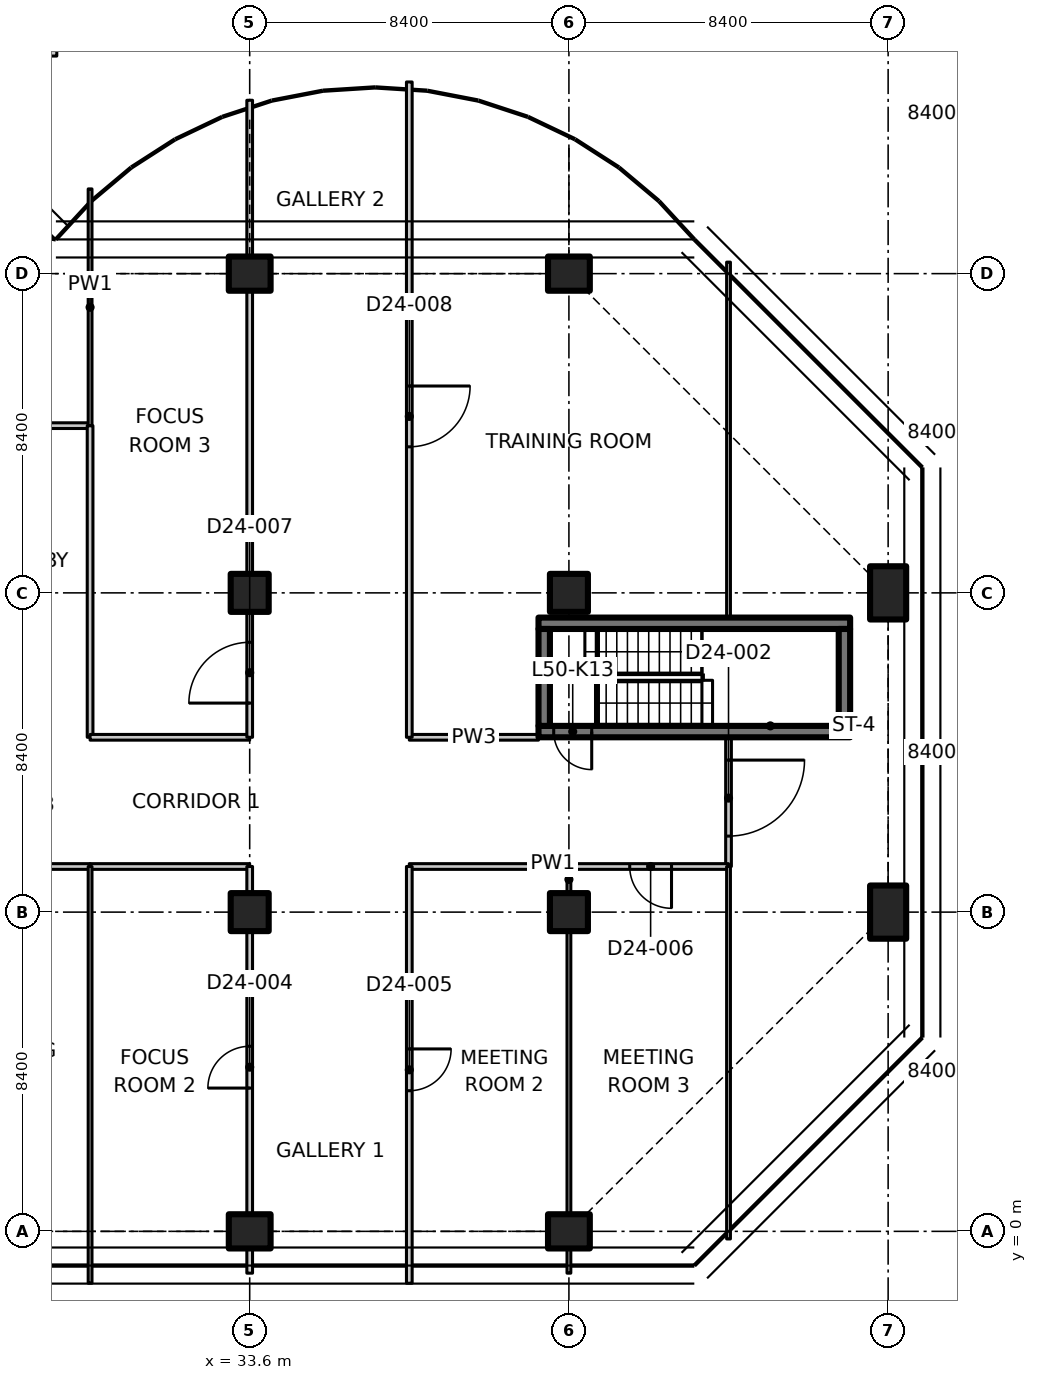
"""IFC4 building model, lengths in metres.
Left out: names, types, materials, properties, quantities, classifications, styles, units other than length and angle.
Written with IfcOpenShell. Run it as: python <this file> out.ifc"""

import sys

from ifc_helpers import new_model, si_unit, direction, frame, frame_2d, origin, origin_2d, place, context, subcontext, project, spatial, polyline, rectangle, outline, extrude, element, fill, save


model = new_model("IFC4")
c1 = context("Model", 3, precision=1e-05, world=origin(), true_north=direction((0.0, 1.0)))
c2 = subcontext(c1, "Body", "Model", "MODEL_VIEW")
j1 = project(units=[si_unit("LENGTHUNIT", "METRE"), si_unit("PLANEANGLEUNIT", "RADIAN")], contexts=[c1])
p1 = place(None, origin())
s1 = spatial("IfcSite", under=j1, at=p1, CompositionType="ELEMENT")
p2 = place(p1, origin())
s2 = spatial("IfcBuilding", under=s1, at=p2, CompositionType="ELEMENT")
p3 = place(p2, frame((0.0, 0.0, 199.2)))
s3 = spatial("IfcBuildingStorey", under=s2, at=p3, CompositionType="ELEMENT", Elevation=199.2)
p4 = place(p3, frame((33.6, 0.0, 0.0), z_axis=(0.0, 0.0, 1.0), x_axis=(0.0, 1.0, 0.0)))
e1 = element("IfcColumn", 1, at=p4, inside=s3, PredefinedType="COLUMN", context=c2, shape_type="SweptSolid", body=[
    extrude(rectangle(XDim=0.9, YDim=1.1, at=origin_2d()), origin(), (0.0, 0.0, 1.0), 3.35),
])
for number, where, z_axis, x_axis in (
    (2, (33.6, 8.4, 0.0), (0.0, 0.0, 1.0), (1.0, 0.0, 0.0)),
    (3, (33.6, 16.8, 0.0), (0.0, 0.0, 1.0), (1.0, 0.0, 0.0)),
):
    element("IfcColumn", number, at=place(p3, frame(where, z_axis=z_axis, x_axis=x_axis)), inside=s3, PredefinedType="COLUMN", context=c2, shape_type="SweptSolid", body=[
        extrude(rectangle(XDim=1.0, YDim=1.0, at=origin_2d()), origin(), (0.0, 0.0, 1.0), 3.35),
    ])
for number, where, z_axis, x_axis in (
    (4, (33.6, 25.2, 0.0), (0.0, 0.0, 1.0), (0.0, 1.0, 0.0)),
    (5, (42.0, 0.0, 0.0), (0.0, 0.0, 1.0), (0.0, 1.0, 0.0)),
):
    element("IfcColumn", number, at=place(p3, frame(where, z_axis=z_axis, x_axis=x_axis)), inside=s3, PredefinedType="COLUMN", context=c2, shape_type="SweptSolid", body=[
        extrude(rectangle(XDim=0.9, YDim=1.1, at=origin_2d()), origin(), (0.0, 0.0, 1.0), 3.35),
    ])
for number, where, z_axis, x_axis in (
    (6, (42.0, 8.4, 0.0), (0.0, 0.0, 1.0), (1.0, 0.0, 0.0)),
    (7, (42.0, 16.8, 0.0), (0.0, 0.0, 1.0), (1.0, 0.0, 0.0)),
):
    element("IfcColumn", number, at=place(p3, frame(where, z_axis=z_axis, x_axis=x_axis)), inside=s3, PredefinedType="COLUMN", context=c2, shape_type="SweptSolid", body=[
        extrude(rectangle(XDim=1.0, YDim=1.0, at=origin_2d()), origin(), (0.0, 0.0, 1.0), 3.35),
    ])
p5 = place(p3, frame((42.0, 25.2, 0.0), z_axis=(0.0, 0.0, 1.0), x_axis=(0.0, 1.0, 0.0)))
e8 = element("IfcColumn", 8, at=p5, inside=s3, PredefinedType="COLUMN", context=c2, shape_type="SweptSolid", body=[
    extrude(rectangle(XDim=0.9, YDim=1.1, at=origin_2d()), origin(), (0.0, 0.0, 1.0), 3.35),
])
for number, where, z_axis, x_axis in (
    (9, (50.4, 8.4, 0.0), (0.0, 0.0, 1.0), (1.0, 0.0, 0.0)),
    (10, (50.4, 16.8, 0.0), (0.0, 0.0, 1.0), (1.0, 0.0, 0.0)),
):
    element("IfcColumn", number, at=place(p3, frame(where, z_axis=z_axis, x_axis=x_axis)), inside=s3, PredefinedType="COLUMN", context=c2, shape_type="SweptSolid", body=[
        extrude(rectangle(XDim=0.95, YDim=1.4, at=origin_2d()), origin(), (0.0, 0.0, 1.0), 3.35),
    ])
p6 = place(p3, frame((49.4, 13.15, 0.0), z_axis=(0.0, 0.0, 1.0), x_axis=(-1.0, 0.0, 0.0)))
e11 = element("IfcWall", 11, at=p6, inside=s3, PredefinedType="SHEAR", context=c2, shape_type="SweptSolid", body=[
    extrude(rectangle(XDim=8.2, YDim=0.3, at=frame_2d((4.1, 0.0))), origin(), (0.0, 0.0, 1.0), 3.35),
])
p7 = place(p6, frame((6.8, 0.0, 0.0)))
e12 = element("IfcOpeningElement", 12, at=p7, cuts=e11, PredefinedType="OPENING", context=c2, shape_type="SweptSolid", body=[
    extrude(rectangle(XDim=1.0, YDim=2.1, at=frame_2d((0.5, 1.05))), frame((0.0, 0.16, 0.0), z_axis=(0.0, -1.0, 0.0), x_axis=(1.0, 0.0, 0.0)), (0.0, 0.0, 1.0), 0.32),
])
p8 = place(p3, frame((41.2, 16.0, 0.0), z_axis=(0.0, 0.0, 1.0), x_axis=(1.0, 0.0, 0.0)))
e13 = element("IfcWall", 13, at=p8, inside=s3, PredefinedType="SHEAR", context=c2, shape_type="SweptSolid", body=[
    extrude(rectangle(XDim=8.2, YDim=0.3, at=frame_2d((4.1, 0.0))), origin(), (0.0, 0.0, 1.0), 3.35),
])
for number, where, z_axis, x_axis in (
    (14, (41.35, 13.3, 0.0), (0.0, 0.0, 1.0), (0.0, 1.0, 0.0)),
    (15, (49.25, 13.3, 0.0), (0.0, 0.0, 1.0), (0.0, 1.0, 0.0)),
):
    element("IfcWall", number, at=place(p3, frame(where, z_axis=z_axis, x_axis=x_axis)), inside=s3, PredefinedType="SHEAR", context=c2, shape_type="SweptSolid", body=[
        extrude(rectangle(XDim=2.55, YDim=0.3, at=frame_2d((1.275, 0.0))), origin(), (0.0, 0.0, 1.0), 3.35),
    ])
p9 = place(p3, frame((25.2, 21.2, 0.0), z_axis=(0.0, 0.0, 1.0), x_axis=(1.0, 0.0, 0.0)))
e16 = element("IfcWall", 16, at=p9, inside=s3, PredefinedType="PARTITIONING", context=c2, shape_type="SweptSolid", body=[
    extrude(rectangle(XDim=4.2, YDim=0.15, at=frame_2d((2.1, 0.0))), origin(), (0.0, 0.0, 1.0), 3.33),
])
p10 = place(p3, frame((29.4, 9.6, 0.0), z_axis=(0.0, 0.0, 1.0), x_axis=(-1.0, 0.0, 0.0)))
e17 = element("IfcWall", 17, at=p10, inside=s3, PredefinedType="PARTITIONING", context=c2, shape_type="SweptSolid", body=[
    extrude(rectangle(XDim=4.2, YDim=0.15, at=frame_2d((2.1, 0.0))), origin(), (0.0, 0.0, 1.0), 3.33),
])
p11 = place(p10, frame((1.5, 0.0, 0.0)))
e18 = element("IfcOpeningElement", 18, at=p11, cuts=e17, PredefinedType="OPENING", context=c2, shape_type="SweptSolid", body=[
    extrude(rectangle(XDim=1.1, YDim=2.1, at=frame_2d((0.55, 1.05))), frame((0.0, 0.085, 0.0), z_axis=(0.0, -1.0, 0.0), x_axis=(1.0, 0.0, 0.0)), (0.0, 0.0, 1.0), 0.17),
])
p12 = place(p3, frame((29.4, 21.2, 0.0), z_axis=(0.0, 0.0, 1.0), x_axis=(0.0, -1.0, 0.0)))
e19 = element("IfcWall", 19, at=p12, inside=s3, PredefinedType="PARTITIONING", context=c2, shape_type="SweptSolid", body=[
    extrude(rectangle(XDim=8.2, YDim=0.15, at=frame_2d((4.1, 0.0))), origin(), (0.0, 0.0, 1.0), 3.33),
])
p13 = place(p3, frame((29.4, 27.429, 0.0), z_axis=(0.0, 0.0, 1.0), x_axis=(0.0, -1.0, 0.0)))
e20 = element("IfcWall", 20, at=p13, inside=s3, PredefinedType="PARTITIONING", context=c2, shape_type="SweptSolid", body=[
    extrude(outline(polyline([(0.0, 0.0), (6.229, 0.0), (6.229, 3.33), (2.679, 3.33), (2.677, 2.98), (1.781, 2.98), (1.779, 3.33), (0.154, 3.33), (0.0, 3.33), (0.0, 0.0)])), frame((0.0, 0.05, 0.0), z_axis=(0.0, -1.0, 0.0), x_axis=(1.0, 0.0, 0.0)), (0.0, 0.0, 1.0), 0.1),
])
p14 = place(p3, frame((25.2, 31.0, 0.0), z_axis=(0.0, 0.0, 1.0), x_axis=(1.0, 0.0, 0.0)))
e21 = element("IfcWall", 21, at=p14, inside=s3, PredefinedType="PARTITIONING", context=c2, shape_type="SweptSolid", body=[
    extrude(rectangle(XDim=3.324, YDim=0.15, at=frame_2d((1.662, 0.0))), origin(), (0.0, 0.0, 1.0), 2.98),
])
p15 = place(p3, frame((46.2, 13.0, 0.0), z_axis=(0.0, 0.0, 1.0), x_axis=(0.0, -1.0, 0.0)))
e22 = element("IfcWall", 22, at=p15, inside=s3, PredefinedType="PARTITIONING", context=c2, shape_type="SweptSolid", body=[
    extrude(rectangle(XDim=3.4, YDim=0.15, at=frame_2d((1.7, 0.0))), origin(), (0.0, 0.0, 1.0), 3.33),
])
p16 = place(p15, frame((0.6, 0.0, 0.0)))
e23 = element("IfcOpeningElement", 23, at=p16, cuts=e22, PredefinedType="OPENING", context=c2, shape_type="SweptSolid", body=[
    extrude(rectangle(XDim=2.0, YDim=2.4, at=frame_2d((1.0, 1.2))), frame((0.0, 0.085, 0.0), z_axis=(0.0, -1.0, 0.0), x_axis=(1.0, 0.0, 0.0)), (0.0, 0.0, 1.0), 0.17),
])
p17 = place(p3, frame((33.6, 9.6, 0.0), z_axis=(0.0, 0.0, 1.0), x_axis=(-1.0, 0.0, 0.0)))
e24 = element("IfcWall", 24, at=p17, inside=s3, PredefinedType="PARTITIONING", context=c2, shape_type="SweptSolid", body=[
    extrude(rectangle(XDim=4.2, YDim=0.15, at=frame_2d((2.1, 0.0))), origin(), (0.0, 0.0, 1.0), 3.33),
])
p18 = place(p3, frame((42.0, 9.6, 0.0), z_axis=(0.0, 0.0, 1.0), x_axis=(-1.0, 0.0, 0.0)))
e25 = element("IfcWall", 25, at=p18, inside=s3, PredefinedType="PARTITIONING", context=c2, shape_type="SweptSolid", body=[
    extrude(rectangle(XDim=4.2, YDim=0.15, at=frame_2d((2.1, 0.0))), origin(), (0.0, 0.0, 1.0), 3.33),
])
p19 = place(p3, frame((46.2, 9.6, 0.0), z_axis=(0.0, 0.0, 1.0), x_axis=(-1.0, 0.0, 0.0)))
e26 = element("IfcWall", 26, at=p19, inside=s3, PredefinedType="PARTITIONING", context=c2, shape_type="SweptSolid", body=[
    extrude(rectangle(XDim=4.2, YDim=0.15, at=frame_2d((2.1, 0.0))), origin(), (0.0, 0.0, 1.0), 3.33),
])
p20 = place(p19, frame((1.5, 0.0, 0.0)))
e27 = element("IfcOpeningElement", 27, at=p20, cuts=e26, PredefinedType="OPENING", context=c2, shape_type="SweptSolid", body=[
    extrude(rectangle(XDim=1.1, YDim=2.1, at=frame_2d((0.55, 1.05))), frame((0.0, 0.085, 0.0), z_axis=(0.0, -1.0, 0.0), x_axis=(1.0, 0.0, 0.0)), (0.0, 0.0, 1.0), 0.17),
])
p21 = place(p3, frame((29.4, 13.0, 0.0), z_axis=(0.0, 0.0, 1.0), x_axis=(1.0, 0.0, 0.0)))
e28 = element("IfcWall", 28, at=p21, inside=s3, PredefinedType="PARTITIONING", context=c2, shape_type="SweptSolid", body=[
    extrude(rectangle(XDim=4.2, YDim=0.15, at=frame_2d((2.1, 0.0))), origin(), (0.0, 0.0, 1.0), 3.33),
])
p22 = place(p3, frame((37.8, 13.0, 0.0), z_axis=(0.0, 0.0, 1.0), x_axis=(1.0, 0.0, 0.0)))
e29 = element("IfcWall", 29, at=p22, inside=s3, PredefinedType="PARTITIONING", context=c2, shape_type="SweptSolid", body=[
    extrude(rectangle(XDim=3.4, YDim=0.15, at=frame_2d((1.7, 0.0))), origin(), (0.0, 0.0, 1.0), 3.33),
])
p23 = place(p3, frame((46.2, -0.2, 0.0), z_axis=(0.0, 0.0, 1.0), x_axis=(0.0, 1.0, 0.0)))
e30 = element("IfcWall", 30, at=p23, inside=s3, PredefinedType="PARTITIONING", context=c2, shape_type="SweptSolid", body=[
    extrude(outline(polyline([(0.0, 0.0), (9.8, 0.0), (9.8, 3.33), (5.066, 3.33), (5.064, 2.98), (3.736, 2.98), (3.734, 3.33), (0.0, 3.33), (0.0, 0.0)])), frame((0.0, 0.05, 0.0), z_axis=(0.0, -1.0, 0.0), x_axis=(1.0, 0.0, 0.0)), (0.0, 0.0, 1.0), 0.1),
])
p24 = place(p3, frame((46.2, 16.15, 0.0), z_axis=(0.0, 0.0, 1.0), x_axis=(0.0, 1.0, 0.0)))
e31 = element("IfcWall", 31, at=p24, inside=s3, PredefinedType="PARTITIONING", context=c2, shape_type="SweptSolid", body=[
    extrude(outline(polyline([(0.0, 0.0), (9.353, 0.0), (9.353, 3.33), (9.25, 3.33), (5.516, 3.33), (5.514, 2.98), (4.186, 2.98), (4.184, 3.33), (0.0, 3.33), (0.0, 0.0)])), frame((0.0, 0.05, 0.0), z_axis=(0.0, -1.0, 0.0), x_axis=(1.0, 0.0, 0.0)), (0.0, 0.0, 1.0), 0.1),
])
p25 = place(p3, frame((33.6, -1.1, 0.0), z_axis=(0.0, 0.0, 1.0), x_axis=(0.0, 1.0, 0.0)))
e32 = element("IfcWall", 32, at=p25, inside=s3, PredefinedType="PARTITIONING", context=c2, shape_type="SweptSolid", body=[
    extrude(rectangle(XDim=0.63, YDim=0.15, at=frame_2d((0.315, 0.0))), origin(), (0.0, 0.0, 1.0), 3.33),
])
p26 = place(p3, frame((33.6, 0.47, 0.0), z_axis=(0.0, 0.0, 1.0), x_axis=(0.0, 1.0, 0.0)))
e33 = element("IfcWall", 33, at=p26, inside=s3, PredefinedType="PARTITIONING", context=c2, shape_type="SweptSolid", body=[
    extrude(rectangle(XDim=7.41, YDim=0.15, at=frame_2d((3.705, 0.0))), origin(), (0.0, 0.0, 1.0), 3.33),
])
p27 = place(p26, frame((3.3, 0.0, 0.0)))
e34 = element("IfcOpeningElement", 34, at=p27, cuts=e33, PredefinedType="OPENING", context=c2, shape_type="SweptSolid", body=[
    extrude(rectangle(XDim=1.1, YDim=2.1, at=frame_2d((0.55, 1.05))), frame((0.0, 0.085, 0.0), z_axis=(0.0, -1.0, 0.0), x_axis=(1.0, 0.0, 0.0)), (0.0, 0.0, 1.0), 0.17),
])
p28 = place(p3, frame((33.6, 8.92, 0.0), z_axis=(0.0, 0.0, 1.0), x_axis=(0.0, 1.0, 0.0)))
e35 = element("IfcWall", 35, at=p28, inside=s3, PredefinedType="PARTITIONING", context=c2, shape_type="SweptSolid", body=[
    extrude(rectangle(XDim=0.68, YDim=0.15, at=frame_2d((0.34, 0.0))), origin(), (0.0, 0.0, 1.0), 3.33),
])
p29 = place(p3, frame((37.8, 9.6, 0.0), z_axis=(0.0, 0.0, 1.0), x_axis=(0.0, -1.0, 0.0)))
e36 = element("IfcWall", 36, at=p29, inside=s3, PredefinedType="PARTITIONING", context=c2, shape_type="SweptSolid", body=[
    extrude(outline(polyline([(0.0, 0.0), (10.965, 0.0), (10.965, 3.33), (10.7, 3.33), (10.05, 3.33), (10.048, 2.98), (9.152, 2.98), (9.15, 3.33), (0.0, 3.33), (0.0, 0.0)])), frame((0.0, 0.075, 0.0), z_axis=(0.0, -1.0, 0.0), x_axis=(1.0, 0.0, 0.0)), (0.0, 0.0, 1.0), 0.15),
])
p30 = place(p29, frame((4.8, 0.0, 0.0)))
e37 = element("IfcOpeningElement", 37, at=p30, cuts=e36, PredefinedType="OPENING", context=c2, shape_type="SweptSolid", body=[
    extrude(rectangle(XDim=1.1, YDim=2.1, at=frame_2d((0.55, 1.05))), frame((0.0, 0.085, 0.0), z_axis=(0.0, -1.0, 0.0), x_axis=(1.0, 0.0, 0.0)), (0.0, 0.0, 1.0), 0.17),
])
p31 = place(p3, frame((29.4, 9.6, 0.0), z_axis=(0.0, 0.0, 1.0), x_axis=(0.0, -1.0, 0.0)))
e38 = element("IfcWall", 38, at=p31, inside=s3, PredefinedType="PARTITIONING", context=c2, shape_type="SweptSolid", body=[
    extrude(outline(polyline([(0.0, 0.0), (10.965, 0.0), (10.965, 3.33), (10.7, 3.33), (10.05, 3.33), (10.048, 2.98), (9.152, 2.98), (9.15, 3.33), (0.0, 3.33), (0.0, 0.0)])), frame((0.0, 0.05, 0.0), z_axis=(0.0, -1.0, 0.0), x_axis=(1.0, 0.0, 0.0)), (0.0, 0.0, 1.0), 0.1),
])
p32 = place(p3, frame((42.0, 9.6, 0.0), z_axis=(0.0, 0.0, 1.0), x_axis=(0.0, -1.0, 0.0)))
e39 = element("IfcWall", 39, at=p32, inside=s3, PredefinedType="PARTITIONING", context=c2, shape_type="SweptSolid", body=[
    extrude(rectangle(XDim=0.68, YDim=0.1, at=frame_2d((0.34, 0.0))), origin(), (0.0, 0.0, 1.0), 3.33),
])
p33 = place(p3, frame((42.0, 7.88, 0.0), z_axis=(0.0, 0.0, 1.0), x_axis=(0.0, -1.0, 0.0)))
e40 = element("IfcWall", 40, at=p33, inside=s3, PredefinedType="PARTITIONING", context=c2, shape_type="SweptSolid", body=[
    extrude(outline(polyline([(0.0, 0.0), (7.41, 0.0), (7.41, 2.98), (7.216, 2.98), (7.214, 3.33), (0.0, 3.33), (0.0, 0.0)])), frame((0.0, 0.05, 0.0), z_axis=(0.0, -1.0, 0.0), x_axis=(1.0, 0.0, 0.0)), (0.0, 0.0, 1.0), 0.1),
])
p34 = place(p3, frame((42.0, -0.47, 0.0), z_axis=(0.0, 0.0, 1.0), x_axis=(0.0, -1.0, 0.0)))
e41 = element("IfcWall", 41, at=p34, inside=s3, PredefinedType="PARTITIONING", context=c2, shape_type="SweptSolid", body=[
    extrude(rectangle(XDim=0.63, YDim=0.1, at=frame_2d((0.315, 0.0))), origin(), (0.0, 0.0, 1.0), 3.33),
])
p35 = place(p3, frame((33.6, 13.0, 0.0), z_axis=(0.0, 0.0, 1.0), x_axis=(0.0, 1.0, 0.0)))
e42 = element("IfcWall", 42, at=p35, inside=s3, PredefinedType="PARTITIONING", context=c2, shape_type="SweptSolid", body=[
    extrude(rectangle(XDim=3.28, YDim=0.15, at=frame_2d((1.64, 0.0))), origin(), (0.0, 0.0, 1.0), 3.33),
])
p36 = place(p35, frame((0.9, 0.0, 0.0)))
e43 = element("IfcOpeningElement", 43, at=p36, cuts=e42, PredefinedType="OPENING", context=c2, shape_type="SweptSolid", body=[
    extrude(rectangle(XDim=1.6, YDim=2.1, at=frame_2d((0.8, 1.05))), frame((0.0, 0.085, 0.0), z_axis=(0.0, -1.0, 0.0), x_axis=(1.0, 0.0, 0.0)), (0.0, 0.0, 1.0), 0.17),
])
p37 = place(p3, frame((33.6, 17.32, 0.0), z_axis=(0.0, 0.0, 1.0), x_axis=(0.0, 1.0, 0.0)))
e44 = element("IfcWall", 44, at=p37, inside=s3, PredefinedType="PARTITIONING", context=c2, shape_type="SweptSolid", body=[
    extrude(rectangle(XDim=7.41, YDim=0.15, at=frame_2d((3.705, 0.0))), origin(), (0.0, 0.0, 1.0), 3.33),
])
p38 = place(p3, frame((33.6, 25.67, 0.0), z_axis=(0.0, 0.0, 1.0), x_axis=(0.0, 1.0, 0.0)))
e45 = element("IfcWall", 45, at=p38, inside=s3, PredefinedType="PARTITIONING", context=c2, shape_type="SweptSolid", body=[
    extrude(rectangle(XDim=4.092, YDim=0.15, at=frame_2d((2.046, 0.0))), origin(), (0.0, 0.0, 1.0), 2.98),
])
p39 = place(p3, frame((37.8, 30.243, 0.0), z_axis=(0.0, 0.0, 1.0), x_axis=(0.0, -1.0, 0.0)))
e46 = element("IfcWall", 46, at=p39, inside=s3, PredefinedType="PARTITIONING", context=c2, shape_type="SweptSolid", body=[
    extrude(outline(polyline([(0.0, 0.0), (17.243, 0.0), (17.243, 3.33), (5.493, 3.33), (5.491, 2.98), (4.595, 2.98), (4.593, 3.33), (0.0, 3.33), (0.0, 0.0)])), frame((0.0, 0.075, 0.0), z_axis=(0.0, -1.0, 0.0), x_axis=(1.0, 0.0, 0.0)), (0.0, 0.0, 1.0), 0.15),
])
p40 = place(p39, frame((8.0, 0.0, 0.0)))
e47 = element("IfcOpeningElement", 47, at=p40, cuts=e46, PredefinedType="OPENING", context=c2, shape_type="SweptSolid", body=[
    extrude(rectangle(XDim=1.6, YDim=2.1, at=frame_2d((0.8, 1.05))), frame((0.0, 0.085, 0.0), z_axis=(0.0, -1.0, 0.0), x_axis=(1.0, 0.0, 0.0)), (0.0, 0.0, 1.0), 0.17),
])
p41 = place(p7, origin())
e48 = element("IfcDoor", 48, at=p41, inside=s3, OperationType="SINGLE_SWING_RIGHT", PredefinedType="DOOR", context=c2, shape_type="SweptSolid", body=[
    extrude(rectangle(XDim=1.0, YDim=2.1, at=frame_2d((0.5, 1.05))), frame((0.0, 0.025, 0.0), z_axis=(0.0, -1.0, 0.0), x_axis=(1.0, 0.0, 0.0)), (0.0, 0.0, 1.0), 0.05),
])
fill(e12, e48)
p42 = place(p16, origin())
e49 = element("IfcDoor", 49, at=p42, inside=s3, OperationType="DOUBLE_DOOR_SINGLE_SWING", PredefinedType="DOOR", context=c2, shape_type="SweptSolid", body=[
    extrude(rectangle(XDim=2.0, YDim=2.4, at=frame_2d((1.0, 1.2))), frame((0.0, 0.025, 0.0), z_axis=(0.0, -1.0, 0.0), x_axis=(1.0, 0.0, 0.0)), (0.0, 0.0, 1.0), 0.05),
])
fill(e23, e49)
p43 = place(p27, origin())
e50 = element("IfcDoor", 50, at=p43, inside=s3, OperationType="SINGLE_SWING_LEFT", PredefinedType="DOOR", context=c2, shape_type="SweptSolid", body=[
    extrude(rectangle(XDim=1.1, YDim=2.1, at=frame_2d((0.55, 1.05))), frame((0.0, 0.025, 0.0), z_axis=(0.0, -1.0, 0.0), x_axis=(1.0, 0.0, 0.0)), (0.0, 0.0, 1.0), 0.05),
])
fill(e34, e50)
p44 = place(p30, origin())
e51 = element("IfcDoor", 51, at=p44, inside=s3, OperationType="SINGLE_SWING_LEFT", PredefinedType="DOOR", context=c2, shape_type="SweptSolid", body=[
    extrude(rectangle(XDim=1.1, YDim=2.1, at=frame_2d((0.55, 1.05))), frame((0.0, 0.025, 0.0), z_axis=(0.0, -1.0, 0.0), x_axis=(1.0, 0.0, 0.0)), (0.0, 0.0, 1.0), 0.05),
])
fill(e37, e51)
p45 = place(p20, origin())
e52 = element("IfcDoor", 52, at=p45, inside=s3, OperationType="SINGLE_SWING_LEFT", PredefinedType="DOOR", context=c2, shape_type="SweptSolid", body=[
    extrude(rectangle(XDim=1.1, YDim=2.1, at=frame_2d((0.55, 1.05))), frame((0.0, 0.025, 0.0), z_axis=(0.0, -1.0, 0.0), x_axis=(1.0, 0.0, 0.0)), (0.0, 0.0, 1.0), 0.05),
])
fill(e27, e52)
p46 = place(p36, origin())
e53 = element("IfcDoor", 53, at=p46, inside=s3, OperationType="DOUBLE_DOOR_SINGLE_SWING", PredefinedType="DOOR", context=c2, shape_type="SweptSolid", body=[
    extrude(rectangle(XDim=1.6, YDim=2.1, at=frame_2d((0.8, 1.05))), frame((0.0, 0.025, 0.0), z_axis=(0.0, -1.0, 0.0), x_axis=(1.0, 0.0, 0.0)), (0.0, 0.0, 1.0), 0.05),
])
fill(e43, e53)
p47 = place(p40, origin())
e54 = element("IfcDoor", 54, at=p47, inside=s3, OperationType="DOUBLE_DOOR_SINGLE_SWING", PredefinedType="DOOR", context=c2, shape_type="SweptSolid", body=[
    extrude(rectangle(XDim=1.6, YDim=2.1, at=frame_2d((0.8, 1.05))), frame((0.0, 0.025, 0.0), z_axis=(0.0, -1.0, 0.0), x_axis=(1.0, 0.0, 0.0)), (0.0, 0.0, 1.0), 0.05),
])
fill(e47, e54)
save(model, sys.argv[1])
